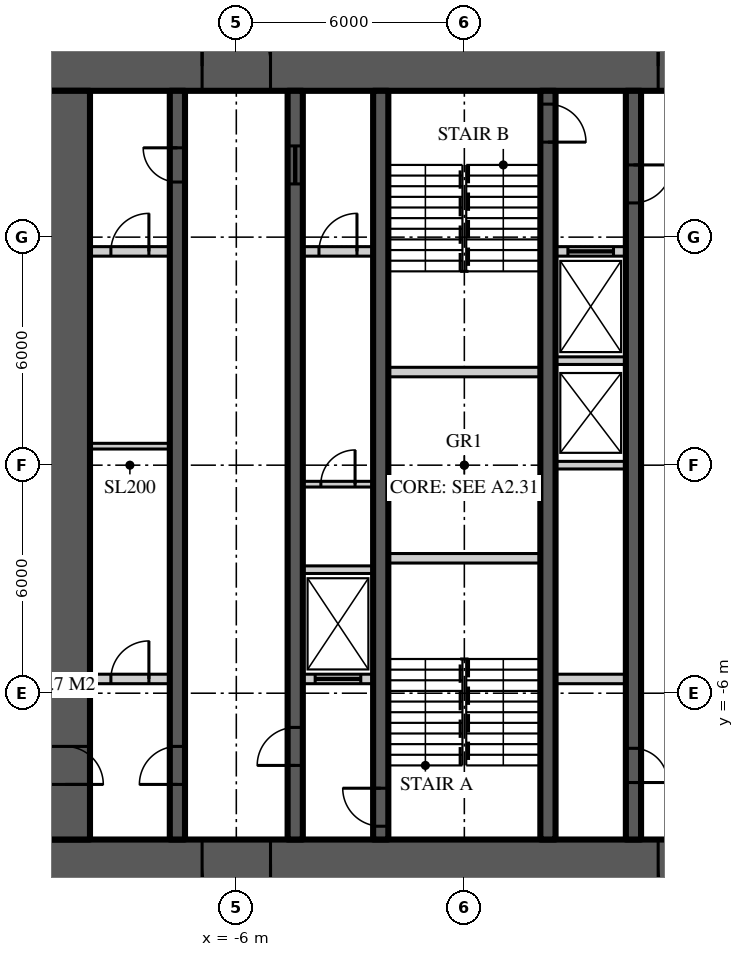
"""IFC4 building model, lengths in metres.
Left out: names, types, materials, properties, quantities, classifications, styles, units other than length and angle.
Written with IfcOpenShell. Run it as: python <this file> out.ifc"""

import sys

from ifc_helpers import new_model, si_unit, direction, frame, frame_2d, origin, place, context, subcontext, project, spatial, rectangle, extrude, element, fill, save


model = new_model("IFC4")
c1 = context("Model", 3, precision=1e-05, world=origin(), true_north=direction((0.0, 1.0)))
c2 = subcontext(c1, "Body", "Model", "MODEL_VIEW")
j1 = project(units=[si_unit("LENGTHUNIT", "METRE"), si_unit("PLANEANGLEUNIT", "RADIAN")], contexts=[c1])
p1 = place(None, origin())
s1 = spatial("IfcSite", under=j1, at=p1, CompositionType="ELEMENT")
p2 = place(p1, origin())
s2 = spatial("IfcBuilding", under=s1, at=p2, CompositionType="ELEMENT")
p3 = place(p2, frame((0.0, 0.0, 228.3)))
s3 = spatial("IfcBuildingStorey", under=s2, at=p3, CompositionType="ELEMENT", Elevation=228.3)
p4 = place(p3, frame((-11.15, 10.5, 0.0), z_axis=(0.0, 0.0, 1.0), x_axis=(1.0, 0.0, 0.0)))
e1 = element("IfcWall", 1, at=p4, inside=s3, PredefinedType="SHEAR", context=c2, shape_type="SweptSolid", body=[
    extrude(rectangle(XDim=22.3, YDim=1.3, at=frame_2d((11.15, 0.0))), origin(), (0.0, 0.0, 1.0), 3.9),
])
p5 = place(p4, frame((4.25, 0.0, 0.0)))
e2 = element("IfcOpeningElement", 2, at=p5, cuts=e1, PredefinedType="OPENING", context=c2, shape_type="SweptSolid", body=[
    extrude(rectangle(XDim=1.8, YDim=2.2, at=frame_2d((0.9, 1.1))), frame((0.0, 0.66, 0.0), z_axis=(0.0, -1.0, 0.0), x_axis=(1.0, 0.0, 0.0)), (0.0, 0.0, 1.0), 1.32),
])
p6 = place(p4, frame((16.25, 0.0, 0.0)))
e3 = element("IfcOpeningElement", 3, at=p6, cuts=e1, PredefinedType="OPENING", context=c2, shape_type="SweptSolid", body=[
    extrude(rectangle(XDim=1.8, YDim=2.2, at=frame_2d((0.9, 1.1))), frame((0.0, 0.66, 0.0), z_axis=(0.0, -1.0, 0.0), x_axis=(1.0, 0.0, 0.0)), (0.0, 0.0, 1.0), 1.32),
])
p7 = place(p3, frame((11.15, -10.5, 0.0), z_axis=(0.0, 0.0, 1.0), x_axis=(-1.0, 0.0, 0.0)))
e4 = element("IfcWall", 4, at=p7, inside=s3, PredefinedType="SHEAR", context=c2, shape_type="SweptSolid", body=[
    extrude(rectangle(XDim=22.3, YDim=1.3, at=frame_2d((11.15, 0.0))), origin(), (0.0, 0.0, 1.0), 3.9),
])
p8 = place(p7, frame((16.25, 0.0, 0.0)))
e5 = element("IfcOpeningElement", 5, at=p8, cuts=e4, PredefinedType="OPENING", context=c2, shape_type="SweptSolid", body=[
    extrude(rectangle(XDim=1.8, YDim=2.2, at=frame_2d((0.9, 1.1))), frame((0.0, 0.66, 0.0), z_axis=(0.0, -1.0, 0.0), x_axis=(1.0, 0.0, 0.0)), (0.0, 0.0, 1.0), 1.32),
])
p9 = place(p7, frame((4.25, 0.0, 0.0)))
e6 = element("IfcOpeningElement", 6, at=p9, cuts=e4, PredefinedType="OPENING", context=c2, shape_type="SweptSolid", body=[
    extrude(rectangle(XDim=1.8, YDim=2.2, at=frame_2d((0.9, 1.1))), frame((0.0, 0.66, 0.0), z_axis=(0.0, -1.0, 0.0), x_axis=(1.0, 0.0, 0.0)), (0.0, 0.0, 1.0), 1.32),
])
p10 = place(p3, frame((-10.5, 9.85, 0.0), z_axis=(0.0, 0.0, 1.0), x_axis=(0.0, -1.0, 0.0)))
e7 = element("IfcWall", 7, at=p10, inside=s3, PredefinedType="SHEAR", context=c2, shape_type="SweptSolid", body=[
    extrude(rectangle(XDim=19.7, YDim=1.3, at=frame_2d((9.85, 0.0))), origin(), (0.0, 0.0, 1.0), 3.9),
])
p11 = place(p10, frame((17.25, 0.0, 0.0)))
e8 = element("IfcOpeningElement", 8, at=p11, cuts=e7, PredefinedType="OPENING", context=c2, shape_type="SweptSolid", body=[
    extrude(rectangle(XDim=1.0, YDim=2.2, at=frame_2d((0.5, 1.1))), frame((0.0, 0.66, 0.0), z_axis=(0.0, -1.0, 0.0), x_axis=(1.0, 0.0, 0.0)), (0.0, 0.0, 1.0), 1.32),
])
p12 = place(p3, frame((-7.55, -9.85, 0.0), z_axis=(0.0, 0.0, 1.0), x_axis=(0.0, 1.0, 0.0)))
e9 = element("IfcWall", 9, at=p12, inside=s3, PredefinedType="SHEAR", context=c2, shape_type="SweptSolid", body=[
    extrude(rectangle(XDim=19.7, YDim=0.4, at=frame_2d((9.85, 0.0))), origin(), (0.0, 0.0, 1.0), 3.9),
])
p13 = place(p12, frame((1.45, 0.0, 0.0)))
e10 = element("IfcOpeningElement", 10, at=p13, cuts=e9, PredefinedType="OPENING", context=c2, shape_type="SweptSolid", body=[
    extrude(rectangle(XDim=1.0, YDim=2.2, at=frame_2d((0.5, 1.1))), frame((0.0, 0.21, 0.0), z_axis=(0.0, -1.0, 0.0), x_axis=(1.0, 0.0, 0.0)), (0.0, 0.0, 1.0), 0.42),
])
p14 = place(p12, frame((17.3, 0.0, 0.0)))
e11 = element("IfcOpeningElement", 11, at=p14, cuts=e9, PredefinedType="OPENING", context=c2, shape_type="SweptSolid", body=[
    extrude(rectangle(XDim=0.9, YDim=2.1, at=frame_2d((0.45, 1.05))), frame((0.0, 0.21, 0.0), z_axis=(0.0, -1.0, 0.0), x_axis=(1.0, 0.0, 0.0)), (0.0, 0.0, 1.0), 0.42),
])
p15 = place(p3, frame((-4.45, -9.85, 0.0), z_axis=(0.0, 0.0, 1.0), x_axis=(0.0, 1.0, 0.0)))
e12 = element("IfcWall", 12, at=p15, inside=s3, PredefinedType="SHEAR", context=c2, shape_type="SweptSolid", body=[
    extrude(rectangle(XDim=19.7, YDim=0.4, at=frame_2d((9.85, 0.0))), origin(), (0.0, 0.0, 1.0), 3.9),
])
p16 = place(p15, frame((1.95, 0.0, 0.0)))
e13 = element("IfcOpeningElement", 13, at=p16, cuts=e12, PredefinedType="OPENING", context=c2, shape_type="SweptSolid", body=[
    extrude(rectangle(XDim=1.0, YDim=2.2, at=frame_2d((0.5, 1.1))), frame((0.0, 0.21, 0.0), z_axis=(0.0, -1.0, 0.0), x_axis=(1.0, 0.0, 0.0)), (0.0, 0.0, 1.0), 0.42),
])
p17 = place(p15, frame((17.25, 0.0, 0.0)))
e14 = element("IfcOpeningElement", 14, at=p17, cuts=e12, PredefinedType="OPENING", context=c2, shape_type="SweptSolid", body=[
    extrude(rectangle(XDim=1.0, YDim=2.1, at=frame_2d((0.5, 1.05))), frame((0.0, 0.21, 0.0), z_axis=(0.0, -1.0, 0.0), x_axis=(1.0, 0.0, 0.0)), (0.0, 0.0, 1.0), 0.42),
])
p18 = place(p3, frame((4.45, 9.85, 0.0), z_axis=(0.0, 0.0, 1.0), x_axis=(0.0, -1.0, 0.0)))
e15 = element("IfcWall", 15, at=p18, inside=s3, PredefinedType="SHEAR", context=c2, shape_type="SweptSolid", body=[
    extrude(rectangle(XDim=19.7, YDim=0.4, at=frame_2d((9.85, 0.0))), origin(), (0.0, 0.0, 1.0), 3.9),
])
p19 = place(p18, frame((1.95, 0.0, 0.0)))
e16 = element("IfcOpeningElement", 16, at=p19, cuts=e15, PredefinedType="OPENING", context=c2, shape_type="SweptSolid", body=[
    extrude(rectangle(XDim=1.0, YDim=2.2, at=frame_2d((0.5, 1.1))), frame((0.0, 0.21, 0.0), z_axis=(0.0, -1.0, 0.0), x_axis=(1.0, 0.0, 0.0)), (0.0, 0.0, 1.0), 0.42),
])
p20 = place(p18, frame((17.3, 0.0, 0.0)))
e17 = element("IfcOpeningElement", 17, at=p20, cuts=e15, PredefinedType="OPENING", context=c2, shape_type="SweptSolid", body=[
    extrude(rectangle(XDim=0.9, YDim=2.1, at=frame_2d((0.45, 1.05))), frame((0.0, 0.21, 0.0), z_axis=(0.0, -1.0, 0.0), x_axis=(1.0, 0.0, 0.0)), (0.0, 0.0, 1.0), 0.42),
])
p21 = place(p3, frame((-2.2, -9.85, 0.0), z_axis=(0.0, 0.0, 1.0), x_axis=(0.0, 1.0, 0.0)))
e18 = element("IfcWall", 18, at=p21, inside=s3, PredefinedType="SHEAR", context=c2, shape_type="SweptSolid", body=[
    extrude(rectangle(XDim=19.7, YDim=0.4, at=frame_2d((9.85, 0.0))), origin(), (0.0, 0.0, 1.0), 3.9),
])
p22 = place(p21, frame((0.35, 0.0, 0.0)))
e19 = element("IfcOpeningElement", 19, at=p22, cuts=e18, PredefinedType="OPENING", context=c2, shape_type="SweptSolid", body=[
    extrude(rectangle(XDim=1.0, YDim=2.2, at=frame_2d((0.5, 1.1))), frame((0.0, 0.21, 0.0), z_axis=(0.0, -1.0, 0.0), x_axis=(1.0, 0.0, 0.0)), (0.0, 0.0, 1.0), 0.42),
])
p23 = place(p3, frame((2.2, 9.85, 0.0), z_axis=(0.0, 0.0, 1.0), x_axis=(0.0, -1.0, 0.0)))
e20 = element("IfcWall", 20, at=p23, inside=s3, PredefinedType="SHEAR", context=c2, shape_type="SweptSolid", body=[
    extrude(rectangle(XDim=19.7, YDim=0.4, at=frame_2d((9.85, 0.0))), origin(), (0.0, 0.0, 1.0), 3.9),
])
p24 = place(p23, frame((0.35, 0.0, 0.0)))
e21 = element("IfcOpeningElement", 21, at=p24, cuts=e20, PredefinedType="OPENING", context=c2, shape_type="SweptSolid", body=[
    extrude(rectangle(XDim=1.0, YDim=2.2, at=frame_2d((0.5, 1.1))), frame((0.0, 0.21, 0.0), z_axis=(0.0, -1.0, 0.0), x_axis=(1.0, 0.0, 0.0)), (0.0, 0.0, 1.0), 0.42),
])
p25 = place(p3, frame((-9.85, 5.625, 0.0), z_axis=(0.0, 0.0, 1.0), x_axis=(1.0, 0.0, 0.0)))
e22 = element("IfcWall", 22, at=p25, inside=s3, PredefinedType="SOLIDWALL", context=c2, shape_type="SweptSolid", body=[
    extrude(rectangle(XDim=2.1, YDim=0.25, at=frame_2d((1.05, 0.0))), origin(), (0.0, 0.0, 1.0), 3.7),
])
p26 = place(p25, frame((0.55, 0.0, 0.0)))
e23 = element("IfcOpeningElement", 23, at=p26, cuts=e22, PredefinedType="OPENING", context=c2, shape_type="SweptSolid", body=[
    extrude(rectangle(XDim=1.0, YDim=2.2, at=frame_2d((0.5, 1.1))), frame((0.0, 0.135, 0.0), z_axis=(0.0, -1.0, 0.0), x_axis=(1.0, 0.0, 0.0)), (0.0, 0.0, 1.0), 0.27),
])
p27 = place(p3, frame((-4.25, 5.625, 0.0), z_axis=(0.0, 0.0, 1.0), x_axis=(1.0, 0.0, 0.0)))
e24 = element("IfcWall", 24, at=p27, inside=s3, PredefinedType="SOLIDWALL", context=c2, shape_type="SweptSolid", body=[
    extrude(rectangle(XDim=1.85, YDim=0.25, at=frame_2d((0.925, 0.0))), origin(), (0.0, 0.0, 1.0), 3.7),
])
p28 = place(p27, frame((0.425, 0.0, 0.0)))
e25 = element("IfcOpeningElement", 25, at=p28, cuts=e24, PredefinedType="OPENING", context=c2, shape_type="SweptSolid", body=[
    extrude(rectangle(XDim=1.0, YDim=2.2, at=frame_2d((0.5, 1.1))), frame((0.0, 0.135, 0.0), z_axis=(0.0, -1.0, 0.0), x_axis=(1.0, 0.0, 0.0)), (0.0, 0.0, 1.0), 0.27),
])
p29 = place(p3, frame((2.4, 5.625, 0.0), z_axis=(0.0, 0.0, 1.0), x_axis=(1.0, 0.0, 0.0)))
e26 = element("IfcWall", 26, at=p29, inside=s3, PredefinedType="SOLIDWALL", context=c2, shape_type="SweptSolid", body=[
    extrude(rectangle(XDim=1.85, YDim=0.25, at=frame_2d((0.925, 0.0))), origin(), (0.0, 0.0, 1.0), 3.7),
])
p30 = place(p29, frame((0.325, 0.0, 0.0)))
e27 = element("IfcOpeningElement", 27, at=p30, cuts=e26, PredefinedType="OPENING", context=c2, shape_type="SweptSolid", body=[
    extrude(rectangle(XDim=1.2, YDim=2.2, at=frame_2d((0.6, 1.1))), frame((0.0, 0.135, 0.0), z_axis=(0.0, -1.0, 0.0), x_axis=(1.0, 0.0, 0.0)), (0.0, 0.0, 1.0), 0.27),
])
p31 = place(p3, frame((-9.85, -5.625, 0.0), z_axis=(0.0, 0.0, 1.0), x_axis=(1.0, 0.0, 0.0)))
e28 = element("IfcWall", 28, at=p31, inside=s3, PredefinedType="SOLIDWALL", context=c2, shape_type="SweptSolid", body=[
    extrude(rectangle(XDim=2.1, YDim=0.25, at=frame_2d((1.05, 0.0))), origin(), (0.0, 0.0, 1.0), 3.7),
])
p32 = place(p31, frame((0.55, 0.0, 0.0)))
e29 = element("IfcOpeningElement", 29, at=p32, cuts=e28, PredefinedType="OPENING", context=c2, shape_type="SweptSolid", body=[
    extrude(rectangle(XDim=1.0, YDim=2.2, at=frame_2d((0.5, 1.1))), frame((0.0, 0.135, 0.0), z_axis=(0.0, -1.0, 0.0), x_axis=(1.0, 0.0, 0.0)), (0.0, 0.0, 1.0), 0.27),
])
p33 = place(p3, frame((-4.25, -5.625, 0.0), z_axis=(0.0, 0.0, 1.0), x_axis=(1.0, 0.0, 0.0)))
e30 = element("IfcWall", 30, at=p33, inside=s3, PredefinedType="SOLIDWALL", context=c2, shape_type="SweptSolid", body=[
    extrude(rectangle(XDim=1.85, YDim=0.25, at=frame_2d((0.925, 0.0))), origin(), (0.0, 0.0, 1.0), 3.7),
])
p34 = place(p33, frame((0.325, 0.0, 0.0)))
e31 = element("IfcOpeningElement", 31, at=p34, cuts=e30, PredefinedType="OPENING", context=c2, shape_type="SweptSolid", body=[
    extrude(rectangle(XDim=1.2, YDim=2.2, at=frame_2d((0.6, 1.1))), frame((0.0, 0.135, 0.0), z_axis=(0.0, -1.0, 0.0), x_axis=(1.0, 0.0, 0.0)), (0.0, 0.0, 1.0), 0.27),
])
p35 = place(p3, frame((2.4, -5.625, 0.0), z_axis=(0.0, 0.0, 1.0), x_axis=(1.0, 0.0, 0.0)))
e32 = element("IfcWall", 32, at=p35, inside=s3, PredefinedType="SOLIDWALL", context=c2, shape_type="SweptSolid", body=[
    extrude(rectangle(XDim=1.85, YDim=0.25, at=frame_2d((0.925, 0.0))), origin(), (0.0, 0.0, 1.0), 3.7),
])
for number, where, z_axis, x_axis in (
    (33, (-2.0, -2.45, 0.0), (0.0, 0.0, 1.0), (1.0, 0.0, 0.0)),
    (34, (-2.0, 2.45, 0.0), (0.0, 0.0, 1.0), (1.0, 0.0, 0.0)),
):
    element("IfcWall", number, at=place(p3, frame(where, z_axis=z_axis, x_axis=x_axis)), inside=s3, PredefinedType="SOLIDWALL", context=c2, shape_type="SweptSolid", body=[
        extrude(rectangle(XDim=4.0, YDim=0.25, at=frame_2d((2.0, 0.0))), origin(), (0.0, 0.0, 1.0), 3.7),
    ])
for number, where, z_axis, x_axis in (
    (35, (-4.25, -2.75, 0.0), (0.0, 0.0, 1.0), (1.0, 0.0, 0.0)),
    (36, (2.4, 0.0, 0.0), (0.0, 0.0, 1.0), (1.0, 0.0, 0.0)),
    (37, (2.4, 2.75, 0.0), (0.0, 0.0, 1.0), (1.0, 0.0, 0.0)),
):
    element("IfcWall", number, at=place(p3, frame(where, z_axis=z_axis, x_axis=x_axis)), inside=s3, PredefinedType="SOLIDWALL", context=c2, shape_type="SweptSolid", body=[
        extrude(rectangle(XDim=1.85, YDim=0.2, at=frame_2d((0.925, 0.0))), origin(), (0.0, 0.0, 1.0), 3.7),
    ])
p36 = place(p3, frame((-9.85, 0.5, 0.0), z_axis=(0.0, 0.0, 1.0), x_axis=(1.0, 0.0, 0.0)))
e38 = element("IfcWall", 38, at=p36, inside=s3, PredefinedType="SOLIDWALL", context=c2, shape_type="SweptSolid", body=[
    extrude(rectangle(XDim=2.1, YDim=0.15, at=frame_2d((1.05, 0.0))), origin(), (0.0, 0.0, 1.0), 3.77),
])
p37 = place(p3, frame((-4.25, -0.5, 0.0), z_axis=(0.0, 0.0, 1.0), x_axis=(1.0, 0.0, 0.0)))
e39 = element("IfcWall", 39, at=p37, inside=s3, PredefinedType="SOLIDWALL", context=c2, shape_type="SweptSolid", body=[
    extrude(rectangle(XDim=1.85, YDim=0.15, at=frame_2d((0.925, 0.0))), origin(), (0.0, 0.0, 1.0), 3.77),
])
p38 = place(p37, frame((0.475, 0.0, 0.0)))
e40 = element("IfcOpeningElement", 40, at=p38, cuts=e39, PredefinedType="OPENING", context=c2, shape_type="SweptSolid", body=[
    extrude(rectangle(XDim=0.9, YDim=2.1, at=frame_2d((0.45, 1.05))), frame((0.0, 0.085, 0.0), z_axis=(0.0, -1.0, 0.0), x_axis=(1.0, 0.0, 0.0)), (0.0, 0.0, 1.0), 0.17),
])
p39 = place(p5, origin())
e41 = element("IfcDoor", 41, at=p39, inside=s3, OperationType="DOUBLE_DOOR_DOUBLE_SWING", PredefinedType="DOOR", context=c2, shape_type="SweptSolid", body=[
    extrude(rectangle(XDim=1.8, YDim=2.2, at=frame_2d((0.9, 1.1))), frame((0.0, 0.025, 0.0), z_axis=(0.0, -1.0, 0.0), x_axis=(1.0, 0.0, 0.0)), (0.0, 0.0, 1.0), 0.05),
])
fill(e2, e41)
p40 = place(p8, origin())
e42 = element("IfcDoor", 42, at=p40, inside=s3, OperationType="DOUBLE_DOOR_DOUBLE_SWING", PredefinedType="DOOR", context=c2, shape_type="SweptSolid", body=[
    extrude(rectangle(XDim=1.8, YDim=2.2, at=frame_2d((0.9, 1.1))), frame((0.0, 0.025, 0.0), z_axis=(0.0, -1.0, 0.0), x_axis=(1.0, 0.0, 0.0)), (0.0, 0.0, 1.0), 0.05),
])
fill(e5, e42)
p41 = place(p6, origin())
e43 = element("IfcDoor", 43, at=p41, inside=s3, OperationType="DOUBLE_DOOR_DOUBLE_SWING", PredefinedType="DOOR", context=c2, shape_type="SweptSolid", body=[
    extrude(rectangle(XDim=1.8, YDim=2.2, at=frame_2d((0.9, 1.1))), frame((0.0, 0.025, 0.0), z_axis=(0.0, -1.0, 0.0), x_axis=(1.0, 0.0, 0.0)), (0.0, 0.0, 1.0), 0.05),
])
fill(e3, e43)
p42 = place(p9, origin())
e44 = element("IfcDoor", 44, at=p42, inside=s3, OperationType="DOUBLE_DOOR_DOUBLE_SWING", PredefinedType="DOOR", context=c2, shape_type="SweptSolid", body=[
    extrude(rectangle(XDim=1.8, YDim=2.2, at=frame_2d((0.9, 1.1))), frame((0.0, 0.025, 0.0), z_axis=(0.0, -1.0, 0.0), x_axis=(1.0, 0.0, 0.0)), (0.0, 0.0, 1.0), 0.05),
])
fill(e6, e44)
p43 = place(p13, origin())
e45 = element("IfcDoor", 45, at=p43, inside=s3, OperationType="SINGLE_SWING_LEFT", PredefinedType="DOOR", context=c2, shape_type="SweptSolid", body=[
    extrude(rectangle(XDim=1.0, YDim=2.2, at=frame_2d((0.5, 1.1))), frame((0.0, 0.025, 0.0), z_axis=(0.0, -1.0, 0.0), x_axis=(1.0, 0.0, 0.0)), (0.0, 0.0, 1.0), 0.05),
])
fill(e10, e45)
p44 = place(p11, origin())
e46 = element("IfcDoor", 46, at=p44, inside=s3, OperationType="SINGLE_SWING_RIGHT", PredefinedType="DOOR", context=c2, shape_type="SweptSolid", body=[
    extrude(rectangle(XDim=1.0, YDim=2.2, at=frame_2d((0.5, 1.1))), frame((0.0, 0.025, 0.0), z_axis=(0.0, -1.0, 0.0), x_axis=(1.0, 0.0, 0.0)), (0.0, 0.0, 1.0), 0.05),
])
fill(e8, e46)
p45 = place(p16, origin())
e47 = element("IfcDoor", 47, at=p45, inside=s3, OperationType="SINGLE_SWING_LEFT", PredefinedType="DOOR", context=c2, shape_type="SweptSolid", body=[
    extrude(rectangle(XDim=1.0, YDim=2.2, at=frame_2d((0.5, 1.1))), frame((0.0, 0.025, 0.0), z_axis=(0.0, -1.0, 0.0), x_axis=(1.0, 0.0, 0.0)), (0.0, 0.0, 1.0), 0.05),
])
fill(e13, e47)
p46 = place(p22, origin())
e48 = element("IfcDoor", 48, at=p46, inside=s3, OperationType="SINGLE_SWING_RIGHT", PredefinedType="DOOR", context=c2, shape_type="SweptSolid", body=[
    extrude(rectangle(XDim=1.0, YDim=2.2, at=frame_2d((0.5, 1.1))), frame((0.0, 0.025, 0.0), z_axis=(0.0, -1.0, 0.0), x_axis=(1.0, 0.0, 0.0)), (0.0, 0.0, 1.0), 0.05),
])
fill(e19, e48)
p47 = place(p19, origin())
e49 = element("IfcDoor", 49, at=p47, inside=s3, OperationType="SINGLE_SWING_LEFT", PredefinedType="DOOR", context=c2, shape_type="SweptSolid", body=[
    extrude(rectangle(XDim=1.0, YDim=2.2, at=frame_2d((0.5, 1.1))), frame((0.0, 0.025, 0.0), z_axis=(0.0, -1.0, 0.0), x_axis=(1.0, 0.0, 0.0)), (0.0, 0.0, 1.0), 0.05),
])
fill(e16, e49)
p48 = place(p24, origin())
e50 = element("IfcDoor", 50, at=p48, inside=s3, OperationType="SINGLE_SWING_RIGHT", PredefinedType="DOOR", context=c2, shape_type="SweptSolid", body=[
    extrude(rectangle(XDim=1.0, YDim=2.2, at=frame_2d((0.5, 1.1))), frame((0.0, 0.025, 0.0), z_axis=(0.0, -1.0, 0.0), x_axis=(1.0, 0.0, 0.0)), (0.0, 0.0, 1.0), 0.05),
])
fill(e21, e50)
p49 = place(p14, origin())
e51 = element("IfcDoor", 51, at=p49, inside=s3, OperationType="SINGLE_SWING_RIGHT", PredefinedType="DOOR", context=c2, shape_type="SweptSolid", body=[
    extrude(rectangle(XDim=0.9, YDim=2.1, at=frame_2d((0.45, 1.05))), frame((0.0, 0.025, 0.0), z_axis=(0.0, -1.0, 0.0), x_axis=(1.0, 0.0, 0.0)), (0.0, 0.0, 1.0), 0.05),
])
fill(e11, e51)
p50 = place(p17, origin())
e52 = element("IfcDoor", 52, at=p50, inside=s3, OperationType="SLIDING_TO_LEFT", PredefinedType="DOOR", context=c2, shape_type="SweptSolid", body=[
    extrude(rectangle(XDim=1.0, YDim=2.1, at=frame_2d((0.5, 1.05))), frame((0.0, 0.025, 0.0), z_axis=(0.0, -1.0, 0.0), x_axis=(1.0, 0.0, 0.0)), (0.0, 0.0, 1.0), 0.05),
])
fill(e14, e52)
p51 = place(p20, origin())
e53 = element("IfcDoor", 53, at=p51, inside=s3, OperationType="SINGLE_SWING_RIGHT", PredefinedType="DOOR", context=c2, shape_type="SweptSolid", body=[
    extrude(rectangle(XDim=0.9, YDim=2.1, at=frame_2d((0.45, 1.05))), frame((0.0, 0.025, 0.0), z_axis=(0.0, -1.0, 0.0), x_axis=(1.0, 0.0, 0.0)), (0.0, 0.0, 1.0), 0.05),
])
fill(e17, e53)
p52 = place(p34, origin())
e54 = element("IfcDoor", 54, at=p52, inside=s3, OperationType="SLIDING_TO_LEFT", PredefinedType="DOOR", context=c2, shape_type="SweptSolid", body=[
    extrude(rectangle(XDim=1.2, YDim=2.2, at=frame_2d((0.6, 1.1))), frame((0.0, 0.025, 0.0), z_axis=(0.0, -1.0, 0.0), x_axis=(1.0, 0.0, 0.0)), (0.0, 0.0, 1.0), 0.05),
])
fill(e31, e54)
p53 = place(p30, origin())
e55 = element("IfcDoor", 55, at=p53, inside=s3, OperationType="SLIDING_TO_LEFT", PredefinedType="DOOR", context=c2, shape_type="SweptSolid", body=[
    extrude(rectangle(XDim=1.2, YDim=2.2, at=frame_2d((0.6, 1.1))), frame((0.0, 0.025, 0.0), z_axis=(0.0, -1.0, 0.0), x_axis=(1.0, 0.0, 0.0)), (0.0, 0.0, 1.0), 0.05),
])
fill(e27, e55)
p54 = place(p26, origin())
e56 = element("IfcDoor", 56, at=p54, inside=s3, OperationType="SINGLE_SWING_RIGHT", PredefinedType="DOOR", context=c2, shape_type="SweptSolid", body=[
    extrude(rectangle(XDim=1.0, YDim=2.2, at=frame_2d((0.5, 1.1))), frame((0.0, 0.025, 0.0), z_axis=(0.0, -1.0, 0.0), x_axis=(1.0, 0.0, 0.0)), (0.0, 0.0, 1.0), 0.05),
])
fill(e23, e56)
p55 = place(p32, origin())
e57 = element("IfcDoor", 57, at=p55, inside=s3, OperationType="SINGLE_SWING_RIGHT", PredefinedType="DOOR", context=c2, shape_type="SweptSolid", body=[
    extrude(rectangle(XDim=1.0, YDim=2.2, at=frame_2d((0.5, 1.1))), frame((0.0, 0.025, 0.0), z_axis=(0.0, -1.0, 0.0), x_axis=(1.0, 0.0, 0.0)), (0.0, 0.0, 1.0), 0.05),
])
fill(e29, e57)
p56 = place(p38, origin())
e58 = element("IfcDoor", 58, at=p56, inside=s3, OperationType="SINGLE_SWING_RIGHT", PredefinedType="DOOR", context=c2, shape_type="SweptSolid", body=[
    extrude(rectangle(XDim=0.9, YDim=2.1, at=frame_2d((0.45, 1.05))), frame((0.0, 0.025, 0.0), z_axis=(0.0, -1.0, 0.0), x_axis=(1.0, 0.0, 0.0)), (0.0, 0.0, 1.0), 0.05),
])
fill(e40, e58)
p57 = place(p28, origin())
e59 = element("IfcDoor", 59, at=p57, inside=s3, OperationType="SINGLE_SWING_RIGHT", PredefinedType="DOOR", context=c2, shape_type="SweptSolid", body=[
    extrude(rectangle(XDim=1.0, YDim=2.2, at=frame_2d((0.5, 1.1))), frame((0.0, 0.025, 0.0), z_axis=(0.0, -1.0, 0.0), x_axis=(1.0, 0.0, 0.0)), (0.0, 0.0, 1.0), 0.05),
])
fill(e25, e59)
save(model, sys.argv[1])
